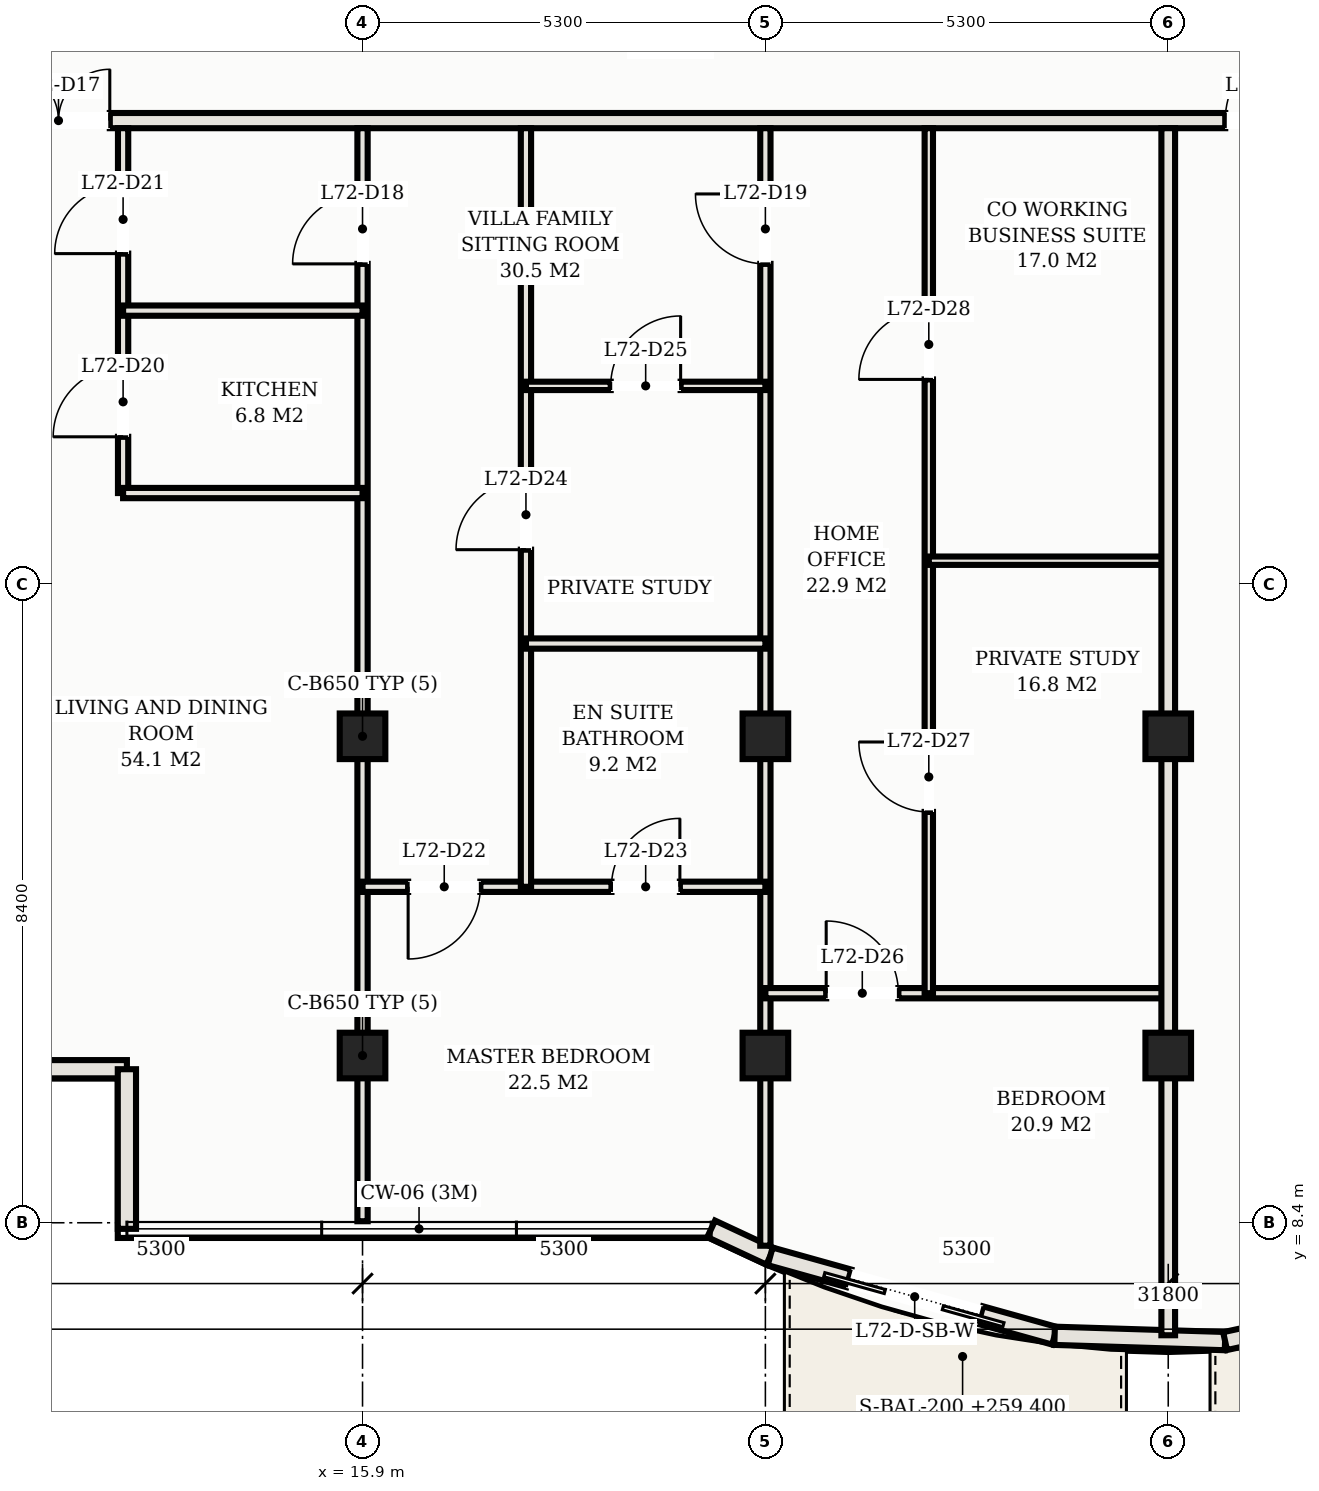
"""IFC4 building model, lengths in metres.
Left out: names, types, materials, properties, quantities, classifications, styles, units other than length and angle.
Written with IfcOpenShell. Run it as: python <this file> out.ifc"""

import sys

from ifc_helpers import new_model, si_unit, direction, frame, frame_2d, origin, origin_2d, place, context, subcontext, project, spatial, rectangle, hollow_rectangle, extrude, element, fill, save


model = new_model("IFC4")
c1 = context("Model", 3, precision=1e-05, world=origin(), true_north=direction((0.0, 1.0)))
c2 = subcontext(c1, "Body", "Model", "MODEL_VIEW")
j1 = project(units=[si_unit("LENGTHUNIT", "METRE"), si_unit("PLANEANGLEUNIT", "RADIAN")], contexts=[c1])
p1 = place(None, origin())
s1 = spatial("IfcSite", under=j1, at=p1, CompositionType="ELEMENT")
p2 = place(p1, origin())
s2 = spatial("IfcBuilding", under=s1, at=p2, CompositionType="ELEMENT")
p3 = place(p2, frame((0.0, 0.0, 259.4)))
s3 = spatial("IfcBuildingStorey", under=s2, at=p3, CompositionType="ELEMENT", Elevation=259.4)
for number, where, z_axis, x_axis in (
    (1, (15.9, 14.8, 0.0), (0.0, 0.0, 1.0), (1.0, 0.0, 0.0)),
    (2, (15.9, 10.6, 0.0), (0.0, 0.0, 1.0), (1.0, 0.0, 0.0)),
    (3, (21.2, 14.8, 0.0), (0.0, 0.0, 1.0), (1.0, 0.0, 0.0)),
    (4, (21.2, 10.6, 0.0), (0.0, 0.0, 1.0), (1.0, 0.0, 0.0)),
    (5, (26.5, 14.8, 0.0), (0.0, 0.0, 1.0), (1.0, 0.0, 0.0)),
    (6, (26.5, 10.6, 0.0), (0.0, 0.0, 1.0), (1.0, 0.0, 0.0)),
):
    element("IfcColumn", number, at=place(p3, frame(where, z_axis=z_axis, x_axis=x_axis)), inside=s3, PredefinedType="COLUMN", context=c2, shape_type="SweptSolid", body=[
        extrude(hollow_rectangle(XDim=0.6, YDim=0.6, WallThickness=0.022, at=origin_2d()), origin(), (0.0, 0.0, 1.0), 3.3),
    ])
p4 = place(p3, frame((10.7, 10.42, 0.0), z_axis=(0.0, 0.0, 1.0), x_axis=(1.0, 0.0, 0.0)))
e7 = element("IfcWall", 7, at=p4, inside=s3, PredefinedType="SOLIDWALL", context=c2, shape_type="SweptSolid", body=[
    extrude(rectangle(XDim=2.1, YDim=0.24, at=frame_2d((1.05, 0.0))), origin(), (0.0, 0.0, 1.0), 3.11),
])
p5 = place(p3, frame((12.8, 10.42, 0.0), z_axis=(0.0, 0.0, 1.0), x_axis=(0.0, -1.0, 0.0)))
e8 = element("IfcWall", 8, at=p5, inside=s3, PredefinedType="SOLIDWALL", context=c2, shape_type="SweptSolid", body=[
    extrude(rectangle(XDim=2.1, YDim=0.24, at=frame_2d((1.05, 0.0))), origin(), (0.0, 0.0, 1.0), 3.11),
])
p6 = place(p3, frame((20.487, 8.32, 0.0), z_axis=(0.0, 0.0, 1.0), x_axis=(0.906190424584, -0.422869855147, 0.0)))
e9 = element("IfcWall", 9, at=p6, inside=s3, PredefinedType="SOLIDWALL", context=c2, shape_type="SweptSolid", body=[
    extrude(rectangle(XDim=0.856, YDim=0.24, at=frame_2d((0.428, 0.0))), origin(), (0.0, 0.0, 1.0), 3.11),
])
p7 = place(p3, frame((21.263, 7.958, 0.0), z_axis=(0.0, 0.0, 1.0), x_axis=(0.963152398068, -0.268956238255, 0.0)))
e10 = element("IfcWall", 10, at=p7, inside=s3, PredefinedType="SOLIDWALL", context=c2, shape_type="SweptSolid", body=[
    extrude(rectangle(XDim=3.885, YDim=0.24, at=frame_2d((1.942, 0.0))), origin(), (0.0, 0.0, 1.0), 3.11),
])
p8 = place(p7, frame((1.074, 0.0, 0.0)))
e11 = element("IfcOpeningElement", 11, at=p8, cuts=e10, PredefinedType="OPENING", context=c2, shape_type="SweptSolid", body=[
    extrude(rectangle(XDim=1.8, YDim=2.2, at=frame_2d((0.9, 1.1))), frame((0.0, 0.13, 0.0), z_axis=(0.0, -1.0, 0.0), x_axis=(1.0, 0.0, 0.0)), (0.0, 0.0, 1.0), 0.26),
])
p9 = place(p3, frame((25.005, 6.913, 0.0), z_axis=(0.0, 0.0, 1.0), x_axis=(0.99951250052, -0.031221167572, 0.0)))
e12 = element("IfcWall", 12, at=p9, inside=s3, PredefinedType="SOLIDWALL", context=c2, shape_type="SweptSolid", body=[
    extrude(rectangle(XDim=2.244, YDim=0.24, at=frame_2d((1.122, 0.0))), origin(), (0.0, 0.0, 1.0), 3.11),
])
p10 = place(p3, frame((27.248, 6.843, 0.0), z_axis=(0.0, 0.0, 1.0), x_axis=(0.977126252677, 0.212660025225, 0.0)))
e13 = element("IfcWall", 13, at=p10, inside=s3, PredefinedType="SOLIDWALL", context=c2, shape_type="SweptSolid", body=[
    extrude(rectangle(XDim=3.828, YDim=0.24, at=frame_2d((1.914, 0.0))), origin(), (0.0, 0.0, 1.0), 3.11),
])
p11 = place(p10, frame((1.014, 0.0, 0.0)))
e14 = element("IfcOpeningElement", 14, at=p11, cuts=e13, PredefinedType="OPENING", context=c2, shape_type="SweptSolid", body=[
    extrude(rectangle(XDim=1.8, YDim=2.2, at=frame_2d((0.9, 1.1))), frame((0.0, 0.13, 0.0), z_axis=(0.0, -1.0, 0.0), x_axis=(1.0, 0.0, 0.0)), (0.0, 0.0, 1.0), 0.26),
])
p12 = place(p3, frame((8.6, 22.9, 0.0), z_axis=(0.0, 0.0, 1.0), x_axis=(1.0, 0.0, 0.0)))
e15 = element("IfcWall", 15, at=p12, inside=s3, PredefinedType="PARTITIONING", context=c2, shape_type="SweptSolid", body=[
    extrude(rectangle(XDim=35.8, YDim=0.2, at=frame_2d((17.9, 0.0))), origin(), (0.0, 0.0, 1.0), 2.45),
])
p13 = place(p12, frame((2.625, 0.0, 0.0)))
e16 = element("IfcOpeningElement", 16, at=p13, cuts=e15, PredefinedType="OPENING", context=c2, shape_type="SweptSolid", body=[
    extrude(rectangle(XDim=1.35, YDim=2.33, at=frame_2d((0.675, 1.165))), frame((0.0, 0.11, 0.0), z_axis=(0.0, -1.0, 0.0), x_axis=(1.0, 0.0, 0.0)), (0.0, 0.0, 1.0), 0.22),
])
p14 = place(p12, frame((18.65, 0.0, 0.0)))
e17 = element("IfcOpeningElement", 17, at=p14, cuts=e15, PredefinedType="OPENING", context=c2, shape_type="SweptSolid", body=[
    extrude(rectangle(XDim=1.1, YDim=2.25, at=frame_2d((0.55, 1.125))), frame((0.0, 0.11, 0.0), z_axis=(0.0, -1.0, 0.0), x_axis=(1.0, 0.0, 0.0)), (0.0, 0.0, 1.0), 0.22),
])
p15 = place(p12, frame((29.25, 0.0, 0.0)))
e18 = element("IfcOpeningElement", 18, at=p15, cuts=e15, PredefinedType="OPENING", context=c2, shape_type="SweptSolid", body=[
    extrude(rectangle(XDim=1.1, YDim=2.25, at=frame_2d((0.55, 1.125))), frame((0.0, 0.11, 0.0), z_axis=(0.0, -1.0, 0.0), x_axis=(1.0, 0.0, 0.0)), (0.0, 0.0, 1.0), 0.22),
])
p16 = place(p12, frame((0.505, 0.0, 0.0)))
e19 = element("IfcOpeningElement", 19, at=p16, cuts=e15, PredefinedType="OPENING", context=c2, shape_type="SweptSolid", body=[
    extrude(rectangle(XDim=0.9, YDim=2.15, at=frame_2d((0.45, 1.075))), frame((0.0, 0.11, 0.0), z_axis=(0.0, -1.0, 0.0), x_axis=(1.0, 0.0, 0.0)), (0.0, 0.0, 1.0), 0.22),
])
p17 = place(p12, frame((34.395, 0.0, 0.0)))
e20 = element("IfcOpeningElement", 20, at=p17, cuts=e15, PredefinedType="OPENING", context=c2, shape_type="SweptSolid", body=[
    extrude(rectangle(XDim=0.9, YDim=2.15, at=frame_2d((0.45, 1.075))), frame((0.0, 0.11, 0.0), z_axis=(0.0, -1.0, 0.0), x_axis=(1.0, 0.0, 0.0)), (0.0, 0.0, 1.0), 0.22),
])
p18 = place(p3, frame((15.9, 8.42, 0.0), z_axis=(0.0, 0.0, 1.0), x_axis=(0.0, 1.0, 0.0)))
e21 = element("IfcWall", 21, at=p18, inside=s3, PredefinedType="PARTITIONING", context=c2, shape_type="SweptSolid", body=[
    extrude(rectangle(XDim=14.38, YDim=0.135, at=frame_2d((7.19, 0.0))), origin(), (0.0, 0.0, 1.0), 2.45),
])
p19 = place(p18, frame((12.595, 0.0, 0.0)))
e22 = element("IfcOpeningElement", 22, at=p19, cuts=e21, PredefinedType="OPENING", context=c2, shape_type="SweptSolid", body=[
    extrude(rectangle(XDim=0.92, YDim=2.15, at=frame_2d((0.46, 1.075))), frame((0.0, 0.078, 0.0), z_axis=(0.0, -1.0, 0.0), x_axis=(1.0, 0.0, 0.0)), (0.0, 0.0, 1.0), 0.155),
])
p20 = place(p3, frame((21.2, 8.098, 0.0), z_axis=(0.0, 0.0, 1.0), x_axis=(0.0, 1.0, 0.0)))
e23 = element("IfcWall", 23, at=p20, inside=s3, PredefinedType="PARTITIONING", context=c2, shape_type="SweptSolid", body=[
    extrude(rectangle(XDim=14.702, YDim=0.135, at=frame_2d((7.351, 0.0))), origin(), (0.0, 0.0, 1.0), 2.45),
])
p21 = place(p20, frame((12.917, 0.0, 0.0)))
e24 = element("IfcOpeningElement", 24, at=p21, cuts=e23, PredefinedType="OPENING", context=c2, shape_type="SweptSolid", body=[
    extrude(rectangle(XDim=0.92, YDim=2.15, at=frame_2d((0.46, 1.075))), frame((0.0, 0.078, 0.0), z_axis=(0.0, -1.0, 0.0), x_axis=(1.0, 0.0, 0.0)), (0.0, 0.0, 1.0), 0.155),
])
p22 = place(p3, frame((12.75, 18.0, 0.0), z_axis=(0.0, 0.0, 1.0), x_axis=(0.0, 1.0, 0.0)))
e25 = element("IfcWall", 25, at=p22, inside=s3, PredefinedType="PARTITIONING", context=c2, shape_type="SweptSolid", body=[
    extrude(rectangle(XDim=4.8, YDim=0.135, at=frame_2d((2.4, 0.0))), origin(), (0.0, 0.0, 1.0), 2.45),
])
p23 = place(p22, frame((0.74, 0.0, 0.0)))
e26 = element("IfcOpeningElement", 26, at=p23, cuts=e25, PredefinedType="OPENING", context=c2, shape_type="SweptSolid", body=[
    extrude(rectangle(XDim=0.92, YDim=2.15, at=frame_2d((0.46, 1.075))), frame((0.0, 0.078, 0.0), z_axis=(0.0, -1.0, 0.0), x_axis=(1.0, 0.0, 0.0)), (0.0, 0.0, 1.0), 0.155),
])
p24 = place(p22, frame((3.15, 0.0, 0.0)))
e27 = element("IfcOpeningElement", 27, at=p24, cuts=e25, PredefinedType="OPENING", context=c2, shape_type="SweptSolid", body=[
    extrude(rectangle(XDim=0.9, YDim=2.15, at=frame_2d((0.45, 1.075))), frame((0.0, 0.078, 0.0), z_axis=(0.0, -1.0, 0.0), x_axis=(1.0, 0.0, 0.0)), (0.0, 0.0, 1.0), 0.155),
])
for number, where, z_axis, x_axis in (
    (28, (12.75, 18.0, 0.0), (0.0, 0.0, 1.0), (1.0, 0.0, 0.0)),
    (29, (12.75, 20.4, 0.0), (0.0, 0.0, 1.0), (1.0, 0.0, 0.0)),
):
    element("IfcWall", number, at=place(p3, frame(where, z_axis=z_axis, x_axis=x_axis)), inside=s3, PredefinedType="PARTITIONING", context=c2, shape_type="SweptSolid", body=[
        extrude(rectangle(XDim=3.15, YDim=0.135, at=frame_2d((1.575, 0.0))), origin(), (0.0, 0.0, 1.0), 2.45),
    ])
p25 = place(p3, frame((15.9, 12.82, 0.0), z_axis=(0.0, 0.0, 1.0), x_axis=(1.0, 0.0, 0.0)))
e30 = element("IfcWall", 30, at=p25, inside=s3, PredefinedType="PARTITIONING", context=c2, shape_type="SweptSolid", body=[
    extrude(rectangle(XDim=5.3, YDim=0.135, at=frame_2d((2.65, 0.0))), origin(), (0.0, 0.0, 1.0), 2.45),
])
p26 = place(p25, frame((0.6, 0.0, 0.0)))
e31 = element("IfcOpeningElement", 31, at=p26, cuts=e30, PredefinedType="OPENING", context=c2, shape_type="SweptSolid", body=[
    extrude(rectangle(XDim=0.95, YDim=2.15, at=frame_2d((0.475, 1.075))), frame((0.0, 0.078, 0.0), z_axis=(0.0, -1.0, 0.0), x_axis=(1.0, 0.0, 0.0)), (0.0, 0.0, 1.0), 0.155),
])
p27 = place(p25, frame((3.275, 0.0, 0.0)))
e32 = element("IfcOpeningElement", 32, at=p27, cuts=e30, PredefinedType="OPENING", context=c2, shape_type="SweptSolid", body=[
    extrude(rectangle(XDim=0.9, YDim=2.15, at=frame_2d((0.45, 1.075))), frame((0.0, 0.078, 0.0), z_axis=(0.0, -1.0, 0.0), x_axis=(1.0, 0.0, 0.0)), (0.0, 0.0, 1.0), 0.155),
])
p28 = place(p3, frame((18.05, 12.82, 0.0), z_axis=(0.0, 0.0, 1.0), x_axis=(0.0, 1.0, 0.0)))
e33 = element("IfcWall", 33, at=p28, inside=s3, PredefinedType="PARTITIONING", context=c2, shape_type="SweptSolid", body=[
    extrude(rectangle(XDim=9.98, YDim=0.135, at=frame_2d((4.99, 0.0))), origin(), (0.0, 0.0, 1.0), 2.45),
])
p29 = place(p28, frame((4.435, 0.0, 0.0)))
e34 = element("IfcOpeningElement", 34, at=p29, cuts=e33, PredefinedType="OPENING", context=c2, shape_type="SweptSolid", body=[
    extrude(rectangle(XDim=0.92, YDim=2.15, at=frame_2d((0.46, 1.075))), frame((0.0, 0.078, 0.0), z_axis=(0.0, -1.0, 0.0), x_axis=(1.0, 0.0, 0.0)), (0.0, 0.0, 1.0), 0.155),
])
p30 = place(p3, frame((18.05, 16.02, 0.0), z_axis=(0.0, 0.0, 1.0), x_axis=(1.0, 0.0, 0.0)))
e35 = element("IfcWall", 35, at=p30, inside=s3, PredefinedType="PARTITIONING", context=c2, shape_type="SweptSolid", body=[
    extrude(rectangle(XDim=3.15, YDim=0.135, at=frame_2d((1.575, 0.0))), origin(), (0.0, 0.0, 1.0), 2.45),
])
p31 = place(p3, frame((18.05, 19.41, 0.0), z_axis=(0.0, 0.0, 1.0), x_axis=(1.0, 0.0, 0.0)))
e36 = element("IfcWall", 36, at=p31, inside=s3, PredefinedType="MOVABLE", context=c2, shape_type="SweptSolid", body=[
    extrude(rectangle(XDim=3.15, YDim=0.11, at=frame_2d((1.575, 0.0))), origin(), (0.0, 0.0, 1.0), 2.45),
])
p32 = place(p31, frame((1.115, 0.0, 0.0)))
e37 = element("IfcOpeningElement", 37, at=p32, cuts=e36, PredefinedType="OPENING", context=c2, shape_type="SweptSolid", body=[
    extrude(rectangle(XDim=0.92, YDim=2.15, at=frame_2d((0.46, 1.075))), frame((0.0, 0.065, 0.0), z_axis=(0.0, -1.0, 0.0), x_axis=(1.0, 0.0, 0.0)), (0.0, 0.0, 1.0), 0.13),
])
p33 = place(p3, frame((21.2, 11.42, 0.0), z_axis=(0.0, 0.0, 1.0), x_axis=(1.0, 0.0, 0.0)))
e38 = element("IfcWall", 38, at=p33, inside=s3, PredefinedType="PARTITIONING", context=c2, shape_type="SweptSolid", body=[
    extrude(rectangle(XDim=5.3, YDim=0.135, at=frame_2d((2.65, 0.0))), origin(), (0.0, 0.0, 1.0), 2.45),
])
p34 = place(p33, frame((0.8, 0.0, 0.0)))
e39 = element("IfcOpeningElement", 39, at=p34, cuts=e38, PredefinedType="OPENING", context=c2, shape_type="SweptSolid", body=[
    extrude(rectangle(XDim=0.95, YDim=2.15, at=frame_2d((0.475, 1.075))), frame((0.0, 0.078, 0.0), z_axis=(0.0, -1.0, 0.0), x_axis=(1.0, 0.0, 0.0)), (0.0, 0.0, 1.0), 0.155),
])
p35 = place(p3, frame((23.35, 11.42, 0.0), z_axis=(0.0, 0.0, 1.0), x_axis=(0.0, 1.0, 0.0)))
e40 = element("IfcWall", 40, at=p35, inside=s3, PredefinedType="MOVABLE", context=c2, shape_type="SweptSolid", body=[
    extrude(rectangle(XDim=11.38, YDim=0.11, at=frame_2d((5.69, 0.0))), origin(), (0.0, 0.0, 1.0), 2.45),
])
p36 = place(p35, frame((2.385, 0.0, 0.0)))
e41 = element("IfcOpeningElement", 41, at=p36, cuts=e40, PredefinedType="OPENING", context=c2, shape_type="SweptSolid", body=[
    extrude(rectangle(XDim=0.92, YDim=2.15, at=frame_2d((0.46, 1.075))), frame((0.0, 0.065, 0.0), z_axis=(0.0, -1.0, 0.0), x_axis=(1.0, 0.0, 0.0)), (0.0, 0.0, 1.0), 0.13),
])
p37 = place(p35, frame((8.075, 0.0, 0.0)))
e42 = element("IfcOpeningElement", 42, at=p37, cuts=e40, PredefinedType="OPENING", context=c2, shape_type="SweptSolid", body=[
    extrude(rectangle(XDim=0.92, YDim=2.15, at=frame_2d((0.46, 1.075))), frame((0.0, 0.065, 0.0), z_axis=(0.0, -1.0, 0.0), x_axis=(1.0, 0.0, 0.0)), (0.0, 0.0, 1.0), 0.13),
])
p38 = place(p3, frame((23.35, 17.11, 0.0), z_axis=(0.0, 0.0, 1.0), x_axis=(1.0, 0.0, 0.0)))
e43 = element("IfcWall", 43, at=p38, inside=s3, PredefinedType="MOVABLE", context=c2, shape_type="SweptSolid", body=[
    extrude(rectangle(XDim=3.15, YDim=0.11, at=frame_2d((1.575, 0.0))), origin(), (0.0, 0.0, 1.0), 2.45),
])
p39 = place(p3, frame((26.5, 6.92, 0.0), z_axis=(0.0, 0.0, 1.0), x_axis=(0.0, 1.0, 0.0)))
e44 = element("IfcWall", 44, at=p39, inside=s3, PredefinedType="PARTITIONING", context=c2, shape_type="SweptSolid", body=[
    extrude(rectangle(XDim=15.88, YDim=0.18, at=frame_2d((7.94, 0.0))), origin(), (0.0, 0.0, 1.0), 2.45),
])
p40 = place(p8, frame((1.8, 0.0, 0.0), z_axis=(0.0, 0.0, 1.0), x_axis=(-1.0, 0.0, 0.0)))
e45 = element("IfcDoor", 45, at=p40, inside=s3, OperationType="DOUBLE_DOOR_SLIDING", PredefinedType="DOOR", context=c2, shape_type="SweptSolid", body=[
    extrude(rectangle(XDim=1.8, YDim=2.2, at=frame_2d((0.9, 1.1))), frame((0.0, 0.025, 0.0), z_axis=(0.0, -1.0, 0.0), x_axis=(1.0, 0.0, 0.0)), (0.0, 0.0, 1.0), 0.05),
])
fill(e11, e45)
p41 = place(p13, origin())
e46 = element("IfcDoor", 46, at=p41, inside=s3, OperationType="DOUBLE_DOOR_SINGLE_SWING", PredefinedType="DOOR", context=c2, shape_type="SweptSolid", body=[
    extrude(rectangle(XDim=1.35, YDim=2.33, at=frame_2d((0.675, 1.165))), frame((0.0, 0.025, 0.0), z_axis=(0.0, -1.0, 0.0), x_axis=(1.0, 0.0, 0.0)), (0.0, 0.0, 1.0), 0.05),
])
fill(e16, e46)
p42 = place(p19, origin())
e47 = element("IfcDoor", 47, at=p42, inside=s3, OperationType="SINGLE_SWING_LEFT", PredefinedType="DOOR", context=c2, shape_type="SweptSolid", body=[
    extrude(rectangle(XDim=0.92, YDim=2.15, at=frame_2d((0.46, 1.075))), frame((0.0, 0.025, 0.0), z_axis=(0.0, -1.0, 0.0), x_axis=(1.0, 0.0, 0.0)), (0.0, 0.0, 1.0), 0.05),
])
fill(e22, e47)
p43 = place(p21, origin())
e48 = element("IfcDoor", 48, at=p43, inside=s3, OperationType="SINGLE_SWING_RIGHT", PredefinedType="DOOR", context=c2, shape_type="SweptSolid", body=[
    extrude(rectangle(XDim=0.92, YDim=2.15, at=frame_2d((0.46, 1.075))), frame((0.0, 0.025, 0.0), z_axis=(0.0, -1.0, 0.0), x_axis=(1.0, 0.0, 0.0)), (0.0, 0.0, 1.0), 0.05),
])
fill(e24, e48)
p44 = place(p23, origin())
e49 = element("IfcDoor", 49, at=p44, inside=s3, OperationType="SINGLE_SWING_LEFT", PredefinedType="DOOR", context=c2, shape_type="SweptSolid", body=[
    extrude(rectangle(XDim=0.92, YDim=2.15, at=frame_2d((0.46, 1.075))), frame((0.0, 0.025, 0.0), z_axis=(0.0, -1.0, 0.0), x_axis=(1.0, 0.0, 0.0)), (0.0, 0.0, 1.0), 0.05),
])
fill(e26, e49)
p45 = place(p24, origin())
e50 = element("IfcDoor", 50, at=p45, inside=s3, OperationType="SINGLE_SWING_LEFT", PredefinedType="DOOR", context=c2, shape_type="SweptSolid", body=[
    extrude(rectangle(XDim=0.9, YDim=2.15, at=frame_2d((0.45, 1.075))), frame((0.0, 0.025, 0.0), z_axis=(0.0, -1.0, 0.0), x_axis=(1.0, 0.0, 0.0)), (0.0, 0.0, 1.0), 0.05),
])
fill(e27, e50)
p46 = place(p26, frame((0.95, 0.0, 0.0), z_axis=(0.0, 0.0, 1.0), x_axis=(-1.0, 0.0, 0.0)))
e51 = element("IfcDoor", 51, at=p46, inside=s3, OperationType="SINGLE_SWING_RIGHT", PredefinedType="DOOR", context=c2, shape_type="SweptSolid", body=[
    extrude(rectangle(XDim=0.95, YDim=2.15, at=frame_2d((0.475, 1.075))), frame((0.0, 0.025, 0.0), z_axis=(0.0, -1.0, 0.0), x_axis=(1.0, 0.0, 0.0)), (0.0, 0.0, 1.0), 0.05),
])
fill(e31, e51)
p47 = place(p27, origin())
e52 = element("IfcDoor", 52, at=p47, inside=s3, OperationType="SINGLE_SWING_RIGHT", PredefinedType="DOOR", context=c2, shape_type="SweptSolid", body=[
    extrude(rectangle(XDim=0.9, YDim=2.15, at=frame_2d((0.45, 1.075))), frame((0.0, 0.025, 0.0), z_axis=(0.0, -1.0, 0.0), x_axis=(1.0, 0.0, 0.0)), (0.0, 0.0, 1.0), 0.05),
])
fill(e32, e52)
p48 = place(p29, origin())
e53 = element("IfcDoor", 53, at=p48, inside=s3, OperationType="SINGLE_SWING_LEFT", PredefinedType="DOOR", context=c2, shape_type="SweptSolid", body=[
    extrude(rectangle(XDim=0.92, YDim=2.15, at=frame_2d((0.46, 1.075))), frame((0.0, 0.025, 0.0), z_axis=(0.0, -1.0, 0.0), x_axis=(1.0, 0.0, 0.0)), (0.0, 0.0, 1.0), 0.05),
])
fill(e34, e53)
p49 = place(p32, origin())
e54 = element("IfcDoor", 54, at=p49, inside=s3, OperationType="SINGLE_SWING_RIGHT", PredefinedType="DOOR", context=c2, shape_type="SweptSolid", body=[
    extrude(rectangle(XDim=0.92, YDim=2.15, at=frame_2d((0.46, 1.075))), frame((0.0, 0.025, 0.0), z_axis=(0.0, -1.0, 0.0), x_axis=(1.0, 0.0, 0.0)), (0.0, 0.0, 1.0), 0.05),
])
fill(e37, e54)
p50 = place(p34, origin())
e55 = element("IfcDoor", 55, at=p50, inside=s3, OperationType="SINGLE_SWING_LEFT", PredefinedType="DOOR", context=c2, shape_type="SweptSolid", body=[
    extrude(rectangle(XDim=0.95, YDim=2.15, at=frame_2d((0.475, 1.075))), frame((0.0, 0.025, 0.0), z_axis=(0.0, -1.0, 0.0), x_axis=(1.0, 0.0, 0.0)), (0.0, 0.0, 1.0), 0.05),
])
fill(e39, e55)
p51 = place(p36, origin())
e56 = element("IfcDoor", 56, at=p51, inside=s3, OperationType="SINGLE_SWING_RIGHT", PredefinedType="DOOR", context=c2, shape_type="SweptSolid", body=[
    extrude(rectangle(XDim=0.92, YDim=2.15, at=frame_2d((0.46, 1.075))), frame((0.0, 0.025, 0.0), z_axis=(0.0, -1.0, 0.0), x_axis=(1.0, 0.0, 0.0)), (0.0, 0.0, 1.0), 0.05),
])
fill(e41, e56)
p52 = place(p37, origin())
e57 = element("IfcDoor", 57, at=p52, inside=s3, OperationType="SINGLE_SWING_LEFT", PredefinedType="DOOR", context=c2, shape_type="SweptSolid", body=[
    extrude(rectangle(XDim=0.92, YDim=2.15, at=frame_2d((0.46, 1.075))), frame((0.0, 0.025, 0.0), z_axis=(0.0, -1.0, 0.0), x_axis=(1.0, 0.0, 0.0)), (0.0, 0.0, 1.0), 0.05),
])
fill(e42, e57)
p53 = place(p14, origin())
e58 = element("IfcDoor", 58, at=p53, inside=s3, OperationType="SINGLE_SWING_RIGHT", PredefinedType="DOOR", context=c2, shape_type="SweptSolid", body=[
    extrude(rectangle(XDim=1.1, YDim=2.25, at=frame_2d((0.55, 1.125))), frame((0.0, 0.025, 0.0), z_axis=(0.0, -1.0, 0.0), x_axis=(1.0, 0.0, 0.0)), (0.0, 0.0, 1.0), 0.05),
])
fill(e17, e58)
save(model, sys.argv[1])
